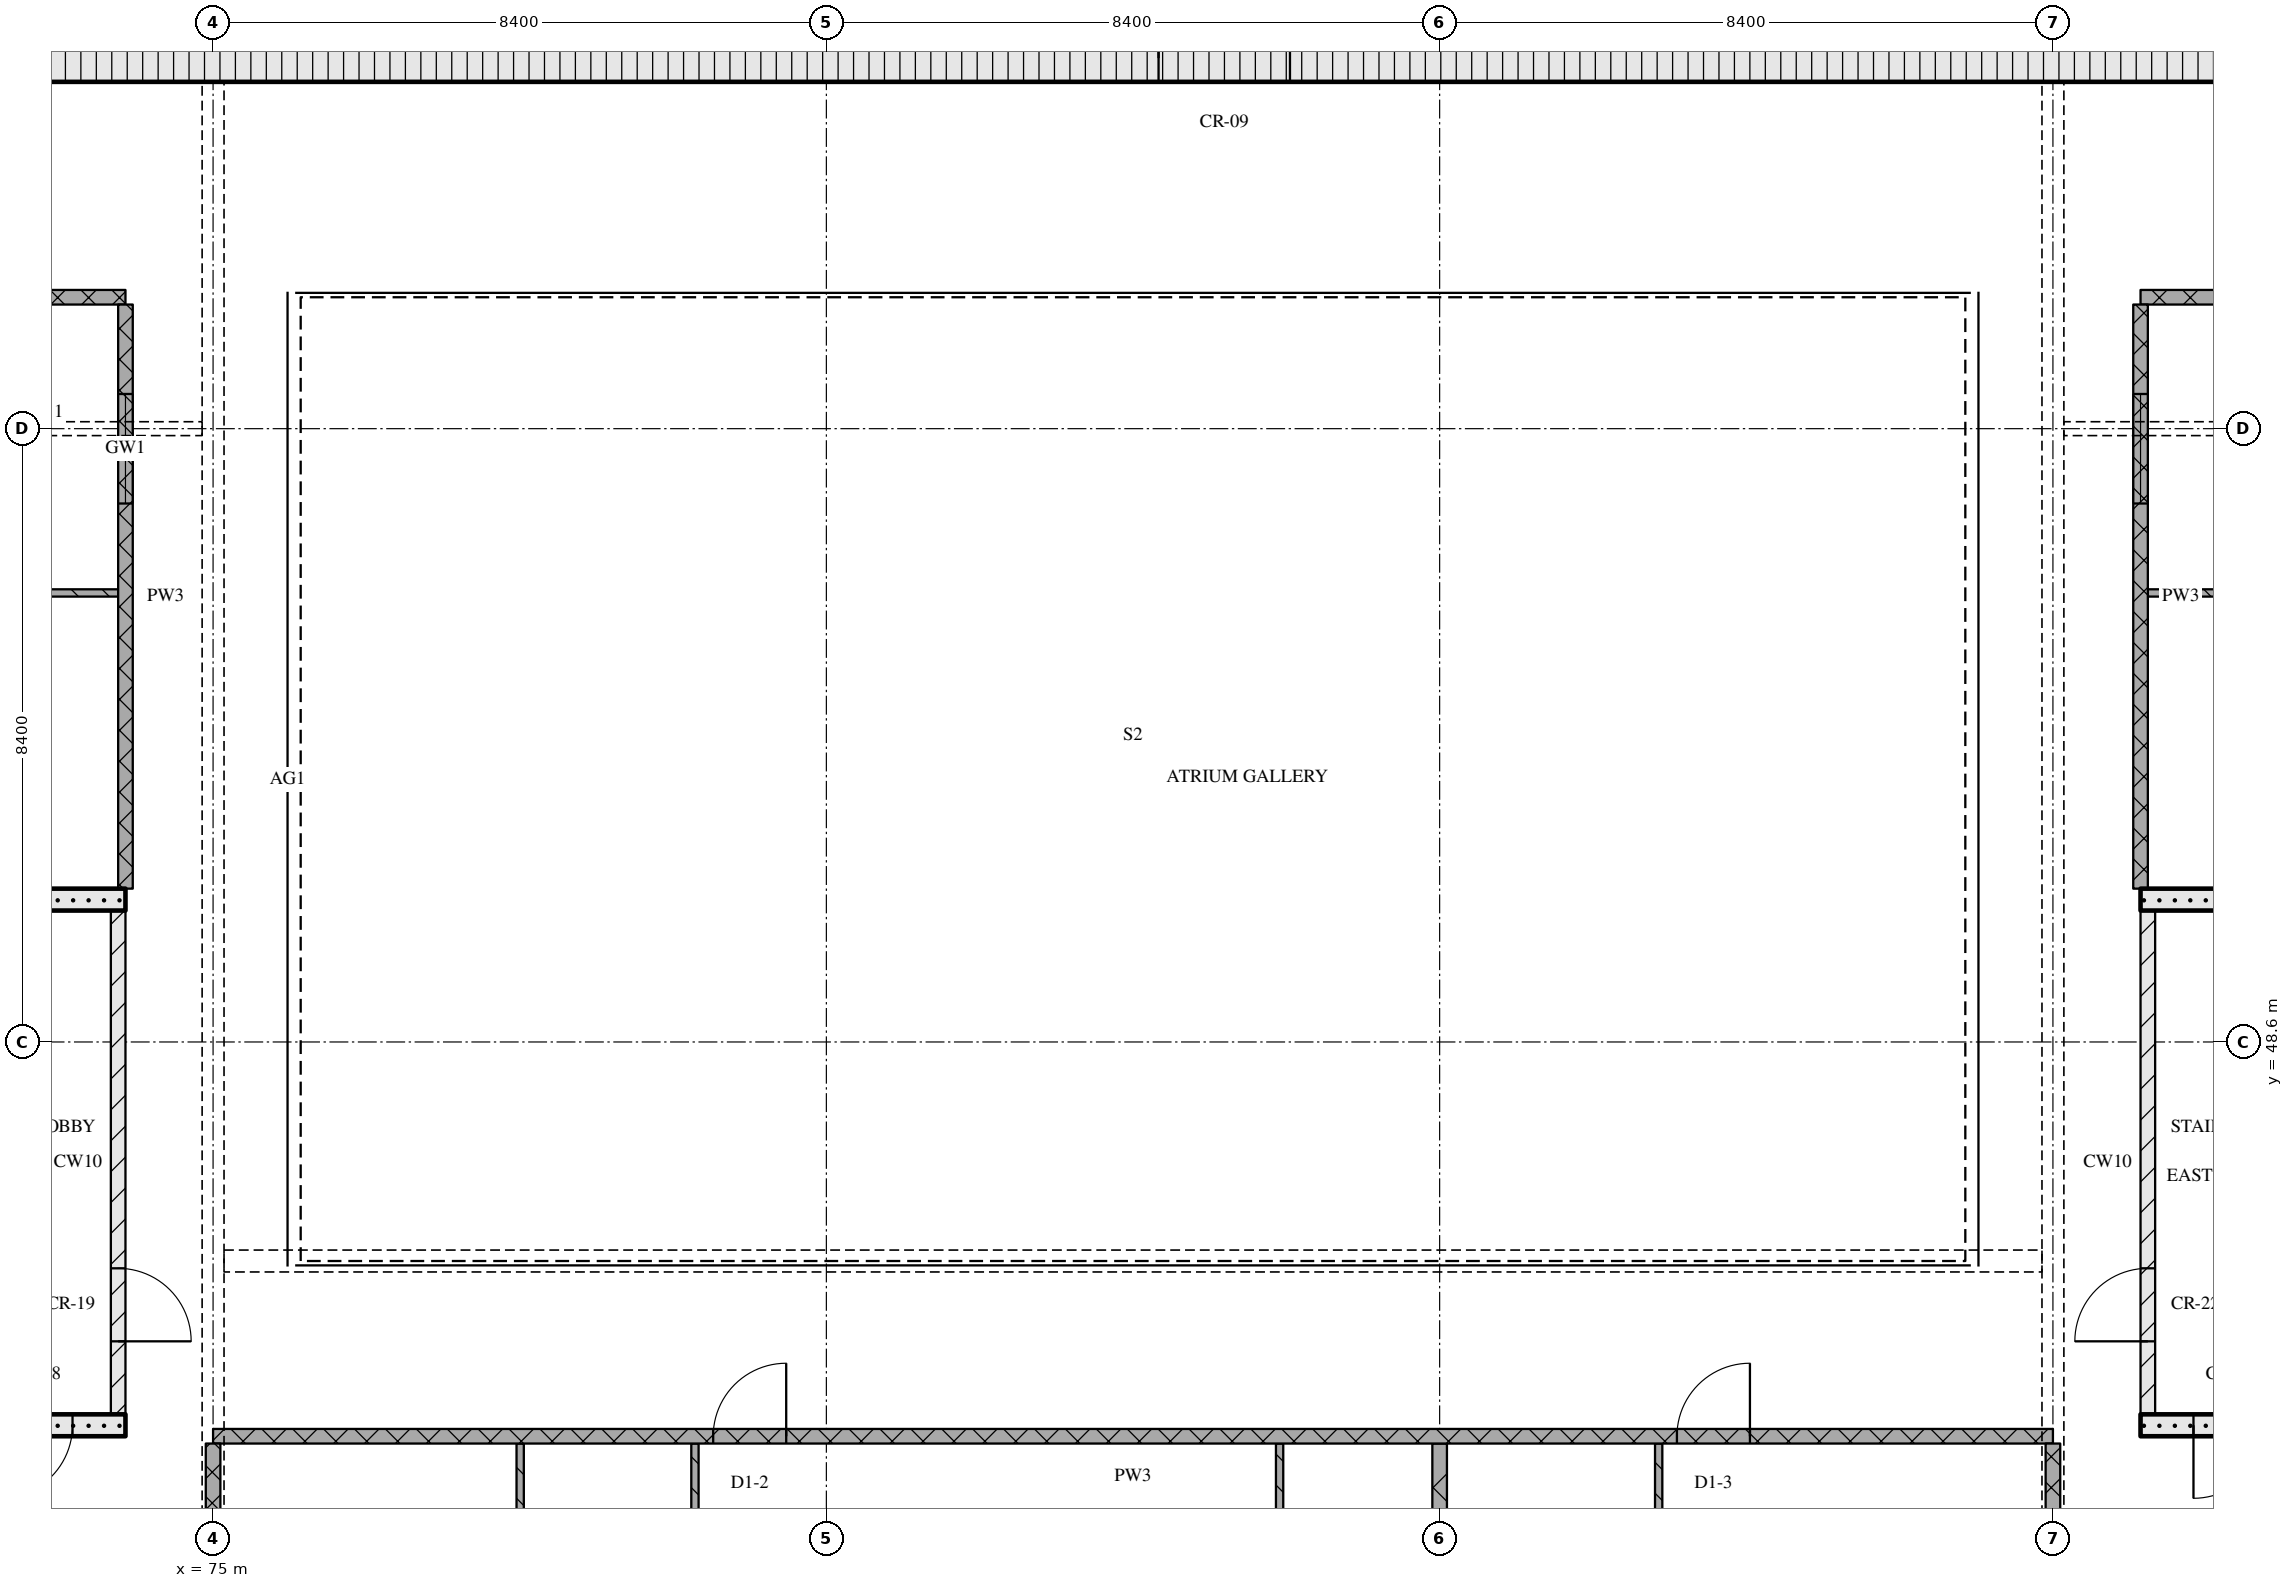
"""IFC4 building model, lengths in metres.
Left out: names, types, materials, properties, quantities, classifications, styles, units other than length and angle.
Written with IfcOpenShell. Run it as: python <this file> out.ifc"""

import sys

from ifc_helpers import new_model, si_unit, direction, frame, frame_2d, origin, place, context, subcontext, project, spatial, rectangle, extrude, element, fill, save


model = new_model("IFC4")
c1 = context("Model", 3, precision=1e-05, world=origin(), true_north=direction((0.0, 1.0)))
c2 = subcontext(c1, "Body", "Model", "MODEL_VIEW")
j1 = project(units=[si_unit("LENGTHUNIT", "METRE"), si_unit("PLANEANGLEUNIT", "RADIAN")], contexts=[c1])
p1 = place(None, origin())
s1 = spatial("IfcSite", under=j1, at=p1, CompositionType="ELEMENT")
p2 = place(p1, origin())
s2 = spatial("IfcBuilding", under=s1, at=p2, CompositionType="ELEMENT")
p3 = place(p2, frame((0.0, 0.0, 212.7)))
s3 = spatial("IfcBuildingStorey", under=s2, at=p3, CompositionType="ELEMENT", Elevation=212.7)
p4 = place(p3, frame((67.15, 62.075, 0.0), z_axis=(0.0, 0.0, 1.0), x_axis=(1.0, 0.0, 0.0)))
e1 = element("IfcWall", 1, at=p4, inside=s3, PredefinedType="SOLIDWALL", context=c2, shape_type="SweptSolid", body=[
    extrude(rectangle(XDim=40.9, YDim=0.65, at=frame_2d((20.45, 0.0))), origin(), (0.0, 0.0, 1.0), 3.32),
])
p5 = place(p4, frame((20.8, 0.0, 0.0)))
e2 = element("IfcOpeningElement", 2, at=p5, cuts=e1, PredefinedType="OPENING", context=c2, shape_type="SweptSolid", body=[
    extrude(rectangle(XDim=1.8, YDim=2.1, at=frame_2d((0.9, 1.05))), frame((0.0, 0.335, 0.0), z_axis=(0.0, -1.0, 0.0), x_axis=(1.0, 0.0, 0.0)), (0.0, 0.0, 1.0), 0.67),
])
p6 = place(p3, frame((68.2, 43.35, 0.0), z_axis=(0.0, 0.0, 1.0), x_axis=(1.0, 0.0, 0.0)))
e3 = element("IfcWall", 3, at=p6, inside=s3, PredefinedType="SOLIDWALL", context=c2, shape_type="SweptSolid", body=[
    extrude(rectangle(XDim=5.6, YDim=0.3, at=frame_2d((2.8, 0.0))), origin(), (0.0, 0.0, 1.0), 3.32),
])
p7 = place(p6, frame((3.875, 0.0, 0.0)))
e4 = element("IfcOpeningElement", 4, at=p7, cuts=e3, PredefinedType="OPENING", context=c2, shape_type="SweptSolid", body=[
    extrude(rectangle(XDim=1.0, YDim=2.1, at=frame_2d((0.5, 1.05))), frame((0.0, 0.16, 0.0), z_axis=(0.0, -1.0, 0.0), x_axis=(1.0, 0.0, 0.0)), (0.0, 0.0, 1.0), 0.32),
])
p8 = place(p3, frame((73.7, 43.5, 0.0), z_axis=(0.0, 0.0, 1.0), x_axis=(0.0, 1.0, 0.0)))
e5 = element("IfcWall", 5, at=p8, inside=s3, PredefinedType="PARTITIONING", context=c2, shape_type="SweptSolid", body=[
    extrude(rectangle(XDim=6.9, YDim=0.2, at=frame_2d((3.45, 0.0))), origin(), (0.0, 0.0, 1.0), 3.32),
])
p9 = place(p8, frame((1.0, 0.0, 0.0)))
e6 = element("IfcOpeningElement", 6, at=p9, cuts=e5, PredefinedType="OPENING", context=c2, shape_type="SweptSolid", body=[
    extrude(rectangle(XDim=1.0, YDim=2.1, at=frame_2d((0.5, 1.05))), frame((0.0, 0.11, 0.0), z_axis=(0.0, -1.0, 0.0), x_axis=(1.0, 0.0, 0.0)), (0.0, 0.0, 1.0), 0.22),
])
p10 = place(p3, frame((68.2, 50.55, 0.0), z_axis=(0.0, 0.0, 1.0), x_axis=(1.0, 0.0, 0.0)))
e7 = element("IfcWall", 7, at=p10, inside=s3, PredefinedType="SOLIDWALL", context=c2, shape_type="SweptSolid", body=[
    extrude(rectangle(XDim=5.6, YDim=0.3, at=frame_2d((2.8, 0.0))), origin(), (0.0, 0.0, 1.0), 3.32),
])
p11 = place(p3, frame((101.4, 43.35, 0.0), z_axis=(0.0, 0.0, 1.0), x_axis=(1.0, 0.0, 0.0)))
e8 = element("IfcWall", 8, at=p11, inside=s3, PredefinedType="SOLIDWALL", context=c2, shape_type="SweptSolid", body=[
    extrude(rectangle(XDim=5.6, YDim=0.3, at=frame_2d((2.8, 0.0))), origin(), (0.0, 0.0, 1.0), 3.32),
])
p12 = place(p11, frame((0.725, 0.0, 0.0)))
e9 = element("IfcOpeningElement", 9, at=p12, cuts=e8, PredefinedType="OPENING", context=c2, shape_type="SweptSolid", body=[
    extrude(rectangle(XDim=1.0, YDim=2.1, at=frame_2d((0.5, 1.05))), frame((0.0, 0.16, 0.0), z_axis=(0.0, -1.0, 0.0), x_axis=(1.0, 0.0, 0.0)), (0.0, 0.0, 1.0), 0.32),
])
p13 = place(p3, frame((101.5, 43.5, 0.0), z_axis=(0.0, 0.0, 1.0), x_axis=(0.0, 1.0, 0.0)))
e10 = element("IfcWall", 10, at=p13, inside=s3, PredefinedType="PARTITIONING", context=c2, shape_type="SweptSolid", body=[
    extrude(rectangle(XDim=6.9, YDim=0.2, at=frame_2d((3.45, 0.0))), origin(), (0.0, 0.0, 1.0), 3.32),
])
p14 = place(p13, frame((1.0, 0.0, 0.0)))
e11 = element("IfcOpeningElement", 11, at=p14, cuts=e10, PredefinedType="OPENING", context=c2, shape_type="SweptSolid", body=[
    extrude(rectangle(XDim=1.0, YDim=2.1, at=frame_2d((0.5, 1.05))), frame((0.0, 0.11, 0.0), z_axis=(0.0, -1.0, 0.0), x_axis=(1.0, 0.0, 0.0)), (0.0, 0.0, 1.0), 0.22),
])
p15 = place(p3, frame((101.4, 50.55, 0.0), z_axis=(0.0, 0.0, 1.0), x_axis=(1.0, 0.0, 0.0)))
e12 = element("IfcWall", 12, at=p15, inside=s3, PredefinedType="SOLIDWALL", context=c2, shape_type="SweptSolid", body=[
    extrude(rectangle(XDim=5.6, YDim=0.3, at=frame_2d((2.8, 0.0))), origin(), (0.0, 0.0, 1.0), 3.32),
])
p16 = place(p3, frame((100.2, 43.2, 0.0), z_axis=(0.0, 0.0, 1.0), x_axis=(-1.0, 0.0, 0.0)))
e13 = element("IfcWall", 13, at=p16, inside=s3, PredefinedType="PARTITIONING", context=c2, shape_type="SweptSolid", body=[
    extrude(rectangle(XDim=25.2, YDim=0.2, at=frame_2d((12.6, 0.0))), origin(), (0.0, 0.0, 1.0), 3.32),
])
p17 = place(p16, frame((4.15, 0.0, 0.0)))
e14 = element("IfcOpeningElement", 14, at=p17, cuts=e13, PredefinedType="OPENING", context=c2, shape_type="SweptSolid", body=[
    extrude(rectangle(XDim=1.0, YDim=2.1, at=frame_2d((0.5, 1.05))), frame((0.0, 0.11, 0.0), z_axis=(0.0, -1.0, 0.0), x_axis=(1.0, 0.0, 0.0)), (0.0, 0.0, 1.0), 0.22),
])
p18 = place(p16, frame((17.35, 0.0, 0.0)))
e15 = element("IfcOpeningElement", 15, at=p18, cuts=e13, PredefinedType="OPENING", context=c2, shape_type="SweptSolid", body=[
    extrude(rectangle(XDim=1.0, YDim=2.1, at=frame_2d((0.5, 1.05))), frame((0.0, 0.11, 0.0), z_axis=(0.0, -1.0, 0.0), x_axis=(1.0, 0.0, 0.0)), (0.0, 0.0, 1.0), 0.22),
])
p19 = place(p3, frame((69.3, 54.75, 0.0), z_axis=(0.0, 0.0, 1.0), x_axis=(1.0, 0.0, 0.0)))
e16 = element("IfcWall", 16, at=p19, inside=s3, PredefinedType="PARTITIONING", context=c2, shape_type="SweptSolid", body=[
    extrude(rectangle(XDim=4.4, YDim=0.1, at=frame_2d((2.2, 0.0))), origin(), (0.0, 0.0, 1.0), 3.32),
])
p20 = place(p3, frame((101.5, 54.75, 0.0), z_axis=(0.0, 0.0, 1.0), x_axis=(1.0, 0.0, 0.0)))
e17 = element("IfcWall", 17, at=p20, inside=s3, PredefinedType="PARTITIONING", context=c2, shape_type="SweptSolid", body=[
    extrude(rectangle(XDim=6.8, YDim=0.1, at=frame_2d((3.4, 0.0))), origin(), (0.0, 0.0, 1.0), 3.32),
])
p21 = place(p20, frame((2.9, 0.0, 0.0)))
e18 = element("IfcOpeningElement", 18, at=p21, cuts=e17, PredefinedType="OPENING", context=c2, shape_type="SweptSolid", body=[
    extrude(rectangle(XDim=0.9, YDim=2.1, at=frame_2d((0.45, 1.05))), frame((0.0, 0.06, 0.0), z_axis=(0.0, -1.0, 0.0), x_axis=(1.0, 0.0, 0.0)), (0.0, 0.0, 1.0), 0.12),
])
for number, where, z_axis, x_axis in (
    (19, (63.0, 58.8, 0.0), (0.0, 0.0, 1.0), (1.0, 0.0, 0.0)),
    (20, (101.4, 58.8, 0.0), (0.0, 0.0, 1.0), (1.0, 0.0, 0.0)),
):
    element("IfcWall", number, at=place(p3, frame(where, z_axis=z_axis, x_axis=x_axis)), inside=s3, PredefinedType="PARTITIONING", context=c2, shape_type="SweptSolid", body=[
        extrude(rectangle(XDim=10.8, YDim=0.2, at=frame_2d((5.4, 0.0))), origin(), (0.0, 0.0, 1.0), 3.32),
    ])
p22 = place(p3, frame((73.8, 58.7, 0.0), z_axis=(0.0, 0.0, 1.0), x_axis=(0.0, -1.0, 0.0)))
e21 = element("IfcWall", 21, at=p22, inside=s3, PredefinedType="PARTITIONING", context=c2, shape_type="SweptSolid", body=[
    extrude(rectangle(XDim=8.0, YDim=0.2, at=frame_2d((4.0, 0.0))), origin(), (0.0, 0.0, 1.0), 3.32),
])
p23 = place(p22, frame((1.225, 0.0, 0.9)))
e22 = element("IfcOpeningElement", 22, at=p23, cuts=e21, PredefinedType="OPENING", context=c2, shape_type="SweptSolid", body=[
    extrude(rectangle(XDim=1.5, YDim=1.5, at=frame_2d((0.75, 0.75))), frame((0.0, 0.11, 0.0), z_axis=(0.0, -1.0, 0.0), x_axis=(1.0, 0.0, 0.0)), (0.0, 0.0, 1.0), 0.22),
])
p24 = place(p3, frame((75.0, 43.1, 0.0), z_axis=(0.0, 0.0, 1.0), x_axis=(0.0, -1.0, 0.0)))
e23 = element("IfcWall", 23, at=p24, inside=s3, PredefinedType="PARTITIONING", context=c2, shape_type="SweptSolid", body=[
    extrude(rectangle(XDim=2.2, YDim=0.2, at=frame_2d((1.1, 0.0))), origin(), (0.0, 0.0, 1.0), 2.53),
])
p25 = place(p3, frame((79.206, 43.1, 0.0), z_axis=(0.0, 0.0, 1.0), x_axis=(0.0, -1.0, 0.0)))
e24 = element("IfcWall", 24, at=p25, inside=s3, PredefinedType="PARTITIONING", context=c2, shape_type="SweptSolid", body=[
    extrude(rectangle(XDim=6.15, YDim=0.1, at=frame_2d((3.075, 0.0))), origin(), (0.0, 0.0, 1.0), 3.32),
])
p26 = place(p3, frame((81.6, 36.95, 0.0), z_axis=(0.0, 0.0, 1.0), x_axis=(0.0, 1.0, 0.0)))
e25 = element("IfcWall", 25, at=p26, inside=s3, PredefinedType="PARTITIONING", context=c2, shape_type="SweptSolid", body=[
    extrude(rectangle(XDim=6.15, YDim=0.1, at=frame_2d((3.075, 0.0))), origin(), (0.0, 0.0, 1.0), 3.32),
])
p27 = place(p26, frame((2.65, 0.0, 0.0)))
e26 = element("IfcOpeningElement", 26, at=p27, cuts=e25, PredefinedType="OPENING", context=c2, shape_type="SweptSolid", body=[
    extrude(rectangle(XDim=0.9, YDim=2.1, at=frame_2d((0.45, 1.05))), frame((0.0, 0.06, 0.0), z_axis=(0.0, -1.0, 0.0), x_axis=(1.0, 0.0, 0.0)), (0.0, 0.0, 1.0), 0.12),
])
p28 = place(p3, frame((89.608, 43.1, 0.0), z_axis=(0.0, 0.0, 1.0), x_axis=(0.0, -1.0, 0.0)))
e27 = element("IfcWall", 27, at=p28, inside=s3, PredefinedType="PARTITIONING", context=c2, shape_type="SweptSolid", body=[
    extrude(rectangle(XDim=6.15, YDim=0.1, at=frame_2d((3.075, 0.0))), origin(), (0.0, 0.0, 1.0), 3.32),
])
p29 = place(p3, frame((91.8, 43.1, 0.0), z_axis=(0.0, 0.0, 1.0), x_axis=(0.0, -1.0, 0.0)))
e28 = element("IfcWall", 28, at=p29, inside=s3, PredefinedType="PARTITIONING", context=c2, shape_type="SweptSolid", body=[
    extrude(rectangle(XDim=2.58, YDim=0.2, at=frame_2d((1.29, 0.0))), origin(), (0.0, 0.0, 1.0), 3.32),
])
p30 = place(p3, frame((94.8, 43.1, 0.0), z_axis=(0.0, 0.0, 1.0), x_axis=(0.0, -1.0, 0.0)))
e29 = element("IfcWall", 29, at=p30, inside=s3, PredefinedType="PARTITIONING", context=c2, shape_type="SweptSolid", body=[
    extrude(rectangle(XDim=5.55, YDim=0.1, at=frame_2d((2.775, 0.0))), origin(), (0.0, 0.0, 1.0), 3.32),
])
p31 = place(p3, frame((100.2, 43.1, 0.0), z_axis=(0.0, 0.0, 1.0), x_axis=(0.0, -1.0, 0.0)))
e30 = element("IfcWall", 30, at=p31, inside=s3, PredefinedType="PARTITIONING", context=c2, shape_type="SweptSolid", body=[
    extrude(rectangle(XDim=2.2, YDim=0.2, at=frame_2d((1.1, 0.0))), origin(), (0.0, 0.0, 1.0), 2.53),
])
p32 = place(p3, frame((101.4, 58.7, 0.0), z_axis=(0.0, 0.0, 1.0), x_axis=(0.0, -1.0, 0.0)))
e31 = element("IfcWall", 31, at=p32, inside=s3, PredefinedType="PARTITIONING", context=c2, shape_type="SweptSolid", body=[
    extrude(rectangle(XDim=8.0, YDim=0.2, at=frame_2d((4.0, 0.0))), origin(), (0.0, 0.0, 1.0), 3.32),
])
p33 = place(p32, frame((1.225, 0.0, 0.9)))
e32 = element("IfcOpeningElement", 32, at=p33, cuts=e31, PredefinedType="OPENING", context=c2, shape_type="SweptSolid", body=[
    extrude(rectangle(XDim=1.5, YDim=1.5, at=frame_2d((0.75, 0.75))), frame((0.0, 0.11, 0.0), z_axis=(0.0, -1.0, 0.0), x_axis=(1.0, 0.0, 0.0)), (0.0, 0.0, 1.0), 0.22),
])
p34 = place(p5, origin())
e33 = element("IfcDoor", 33, at=p34, inside=s3, OperationType="DOUBLE_DOOR_SINGLE_SWING", PredefinedType="DOOR", context=c2, shape_type="SweptSolid", body=[
    extrude(rectangle(XDim=1.8, YDim=2.1, at=frame_2d((0.9, 1.05))), frame((0.0, 0.025, 0.0), z_axis=(0.0, -1.0, 0.0), x_axis=(1.0, 0.0, 0.0)), (0.0, 0.0, 1.0), 0.05),
])
fill(e2, e33)
p35 = place(p7, origin())
e34 = element("IfcDoor", 34, at=p35, inside=s3, OperationType="SINGLE_SWING_RIGHT", PredefinedType="DOOR", context=c2, shape_type="SweptSolid", body=[
    extrude(rectangle(XDim=1.0, YDim=2.1, at=frame_2d((0.5, 1.05))), frame((0.0, 0.025, 0.0), z_axis=(0.0, -1.0, 0.0), x_axis=(1.0, 0.0, 0.0)), (0.0, 0.0, 1.0), 0.05),
])
fill(e4, e34)
p36 = place(p9, origin())
e35 = element("IfcDoor", 35, at=p36, inside=s3, OperationType="SINGLE_SWING_RIGHT", PredefinedType="DOOR", context=c2, shape_type="SweptSolid", body=[
    extrude(rectangle(XDim=1.0, YDim=2.1, at=frame_2d((0.5, 1.05))), frame((0.0, 0.025, 0.0), z_axis=(0.0, -1.0, 0.0), x_axis=(1.0, 0.0, 0.0)), (0.0, 0.0, 1.0), 0.05),
])
fill(e6, e35)
p37 = place(p12, origin())
e36 = element("IfcDoor", 36, at=p37, inside=s3, OperationType="SINGLE_SWING_RIGHT", PredefinedType="DOOR", context=c2, shape_type="SweptSolid", body=[
    extrude(rectangle(XDim=1.0, YDim=2.1, at=frame_2d((0.5, 1.05))), frame((0.0, 0.025, 0.0), z_axis=(0.0, -1.0, 0.0), x_axis=(1.0, 0.0, 0.0)), (0.0, 0.0, 1.0), 0.05),
])
fill(e9, e36)
p38 = place(p14, origin())
e37 = element("IfcDoor", 37, at=p38, inside=s3, OperationType="SINGLE_SWING_LEFT", PredefinedType="DOOR", context=c2, shape_type="SweptSolid", body=[
    extrude(rectangle(XDim=1.0, YDim=2.1, at=frame_2d((0.5, 1.05))), frame((0.0, 0.025, 0.0), z_axis=(0.0, -1.0, 0.0), x_axis=(1.0, 0.0, 0.0)), (0.0, 0.0, 1.0), 0.05),
])
fill(e11, e37)
p39 = place(p17, origin())
e38 = element("IfcDoor", 38, at=p39, inside=s3, OperationType="SINGLE_SWING_RIGHT", PredefinedType="DOOR", context=c2, shape_type="SweptSolid", body=[
    extrude(rectangle(XDim=1.0, YDim=2.1, at=frame_2d((0.5, 1.05))), frame((0.0, 0.025, 0.0), z_axis=(0.0, -1.0, 0.0), x_axis=(1.0, 0.0, 0.0)), (0.0, 0.0, 1.0), 0.05),
])
fill(e14, e38)
p40 = place(p18, origin())
e39 = element("IfcDoor", 39, at=p40, inside=s3, OperationType="SINGLE_SWING_RIGHT", PredefinedType="DOOR", context=c2, shape_type="SweptSolid", body=[
    extrude(rectangle(XDim=1.0, YDim=2.1, at=frame_2d((0.5, 1.05))), frame((0.0, 0.025, 0.0), z_axis=(0.0, -1.0, 0.0), x_axis=(1.0, 0.0, 0.0)), (0.0, 0.0, 1.0), 0.05),
])
fill(e15, e39)
p41 = place(p23, origin())
e40 = element("IfcWindow", 40, at=p41, inside=s3, PartitioningType="SINGLE_PANEL", PredefinedType="WINDOW", context=c2, shape_type="SweptSolid", body=[
    extrude(rectangle(XDim=1.5, YDim=1.5, at=frame_2d((0.75, 0.75))), frame((0.0, 0.03, 0.0), z_axis=(0.0, -1.0, 0.0), x_axis=(1.0, 0.0, 0.0)), (0.0, 0.0, 1.0), 0.06),
])
fill(e22, e40)
p42 = place(p33, origin())
e41 = element("IfcWindow", 41, at=p42, inside=s3, PartitioningType="SINGLE_PANEL", PredefinedType="WINDOW", context=c2, shape_type="SweptSolid", body=[
    extrude(rectangle(XDim=1.5, YDim=1.5, at=frame_2d((0.75, 0.75))), frame((0.0, 0.03, 0.0), z_axis=(0.0, -1.0, 0.0), x_axis=(1.0, 0.0, 0.0)), (0.0, 0.0, 1.0), 0.06),
])
fill(e32, e41)
save(model, sys.argv[1])
